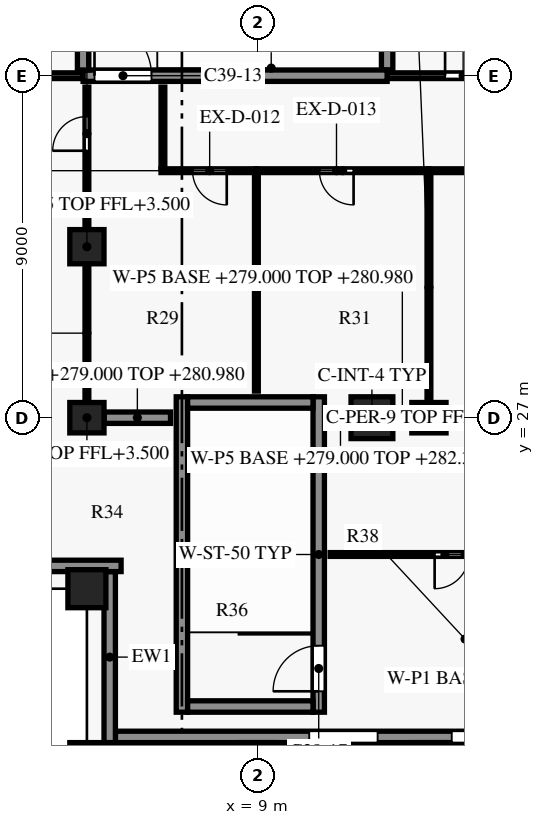
"""IFC4 building model, lengths in metres.
Left out: names, types, materials, properties, quantities, classifications, styles, units other than length and angle.
Written with IfcOpenShell. Run it as: python <this file> out.ifc"""

import sys

from ifc_helpers import new_model, si_unit, direction, frame, frame_2d, origin, origin_2d, place, context, subcontext, project, spatial, rectangle, extrude, element, fill, save


model = new_model("IFC4")
c1 = context("Model", 3, precision=1e-05, world=origin(), true_north=direction((0.0, 1.0)))
c2 = subcontext(c1, "Body", "Model", "MODEL_VIEW")
j1 = project(units=[si_unit("LENGTHUNIT", "METRE"), si_unit("PLANEANGLEUNIT", "RADIAN")], contexts=[c1])
p1 = place(None, origin())
s1 = spatial("IfcSite", under=j1, at=p1, CompositionType="ELEMENT")
p2 = place(p1, origin())
s2 = spatial("IfcBuilding", under=s1, at=p2, CompositionType="ELEMENT")
p3 = place(p2, frame((0.0, 0.0, 279.0)))
s3 = spatial("IfcBuildingStorey", under=s2, at=p3, CompositionType="ELEMENT", Elevation=279.0)
for number, where, z_axis, x_axis in (
    (1, (4.5, 18.0, 0.0), (0.0, 0.0, 1.0), (1.0, 0.0, 0.0)),
    (2, (9.0, 18.0, 0.0), (0.0, 0.0, 1.0), (1.0, 0.0, 0.0)),
    (3, (13.5, 18.0, 0.0), (0.0, 0.0, 1.0), (1.0, 0.0, 0.0)),
):
    element("IfcColumn", number, at=place(p3, frame(where, z_axis=z_axis, x_axis=x_axis)), inside=s3, PredefinedType="COLUMN", context=c2, shape_type="SweptSolid", body=[
        extrude(rectangle(XDim=0.9, YDim=0.9, at=origin_2d()), origin(), (0.0, 0.0, 1.0), 3.8),
    ])
p4 = place(p3, frame((4.5, 22.5, 0.0), z_axis=(0.0, 0.0, 1.0), x_axis=(1.0, 0.0, 0.0)))
e4 = element("IfcColumn", 4, at=p4, inside=s3, PredefinedType="COLUMN", context=c2, shape_type="SweptSolid", body=[
    extrude(rectangle(XDim=1.0, YDim=1.0, at=origin_2d()), origin(), (0.0, 0.0, 1.0), 3.8),
])
p5 = place(p3, frame((12.0, 27.0, 0.0), z_axis=(0.0, 0.0, 1.0), x_axis=(1.0, 0.0, 0.0)))
e5 = element("IfcColumn", 5, at=p5, inside=s3, PredefinedType="COLUMN", context=c2, shape_type="SweptSolid", body=[
    extrude(rectangle(XDim=1.1, YDim=1.1, at=origin_2d()), origin(), (0.0, 0.0, 1.0), 3.8),
])
p6 = place(p3, frame((31.05, 18.6, 0.0), z_axis=(0.0, 0.0, 1.0), x_axis=(-1.0, 0.0, 0.0)))
e6 = element("IfcWall", 6, at=p6, inside=s3, PredefinedType="SOLIDWALL", context=c2, shape_type="SweptSolid", body=[
    extrude(rectangle(XDim=25.8, YDim=0.3, at=frame_2d((12.9, 0.0))), origin(), (0.0, 0.0, 1.0), 3.15),
])
p7 = place(p6, frame((0.9, 0.0, 0.75)))
e7 = element("IfcOpeningElement", 7, at=p7, cuts=e6, PredefinedType="OPENING", context=c2, shape_type="SweptSolid", body=[
    extrude(rectangle(XDim=1.8, YDim=1.8, at=frame_2d((0.9, 0.9))), frame((0.0, 0.16, 0.0), z_axis=(0.0, -1.0, 0.0), x_axis=(1.0, 0.0, 0.0)), (0.0, 0.0, 1.0), 0.32),
])
p8 = place(p6, frame((5.4, 0.0, 0.75)))
e8 = element("IfcOpeningElement", 8, at=p8, cuts=e6, PredefinedType="OPENING", context=c2, shape_type="SweptSolid", body=[
    extrude(rectangle(XDim=1.8, YDim=1.8, at=frame_2d((0.9, 0.9))), frame((0.0, 0.16, 0.0), z_axis=(0.0, -1.0, 0.0), x_axis=(1.0, 0.0, 0.0)), (0.0, 0.0, 1.0), 0.32),
])
p9 = place(p6, frame((9.15, 0.0, 0.15)))
e9 = element("IfcOpeningElement", 9, at=p9, cuts=e6, PredefinedType="OPENING", context=c2, shape_type="SweptSolid", body=[
    extrude(rectangle(XDim=3.3, YDim=2.4, at=frame_2d((1.65, 1.2))), frame((0.0, 0.16, 0.0), z_axis=(0.0, -1.0, 0.0), x_axis=(1.0, 0.0, 0.0)), (0.0, 0.0, 1.0), 0.32),
])
p10 = place(p6, frame((13.65, 0.0, 0.15)))
e10 = element("IfcOpeningElement", 10, at=p10, cuts=e6, PredefinedType="OPENING", context=c2, shape_type="SweptSolid", body=[
    extrude(rectangle(XDim=3.3, YDim=2.4, at=frame_2d((1.65, 1.2))), frame((0.0, 0.16, 0.0), z_axis=(0.0, -1.0, 0.0), x_axis=(1.0, 0.0, 0.0)), (0.0, 0.0, 1.0), 0.32),
])
p11 = place(p6, frame((18.9, 0.0, 0.75)))
e11 = element("IfcOpeningElement", 11, at=p11, cuts=e6, PredefinedType="OPENING", context=c2, shape_type="SweptSolid", body=[
    extrude(rectangle(XDim=1.8, YDim=1.8, at=frame_2d((0.9, 0.9))), frame((0.0, 0.16, 0.0), z_axis=(0.0, -1.0, 0.0), x_axis=(1.0, 0.0, 0.0)), (0.0, 0.0, 1.0), 0.32),
])
p12 = place(p3, frame((5.4, 23.1, 0.0), z_axis=(0.0, 0.0, 1.0), x_axis=(-1.0, 0.0, 0.0)))
e12 = element("IfcWall", 12, at=p12, inside=s3, PredefinedType="SOLIDWALL", context=c2, shape_type="SweptSolid", body=[
    extrude(rectangle(XDim=5.031, YDim=0.3, at=frame_2d((2.516, 0.0))), origin(), (0.0, 0.0, 1.0), 3.15),
])
p13 = place(p3, frame((5.1, 18.45, 0.0), z_axis=(0.0, 0.0, 1.0), x_axis=(0.0, 1.0, 0.0)))
e13 = element("IfcWall", 13, at=p13, inside=s3, PredefinedType="SOLIDWALL", context=c2, shape_type="SweptSolid", body=[
    extrude(rectangle(XDim=4.5, YDim=0.3, at=frame_2d((2.25, 0.0))), origin(), (0.0, 0.0, 1.0), 3.15),
])
for number, where, z_axis, x_axis in (
    (14, (7.15, 19.4, 0.0), (0.0, 0.0, 1.0), (1.0, 0.0, 0.0)),
    (15, (7.15, 27.4, 0.0), (0.0, 0.0, 1.0), (1.0, 0.0, 0.0)),
):
    element("IfcWall", number, at=place(p3, frame(where, z_axis=z_axis, x_axis=x_axis)), inside=s3, PredefinedType="SHEAR", context=c2, shape_type="SweptSolid", body=[
        extrude(rectangle(XDim=3.3, YDim=0.3, at=frame_2d((1.65, 0.0))), origin(), (0.0, 0.0, 1.0), 3.5),
    ])
p14 = place(p3, frame((0.15, 36.0, 0.0), z_axis=(0.0, 0.0, 1.0), x_axis=(1.0, 0.0, 0.0)))
e16 = element("IfcWall", 16, at=p14, inside=s3, PredefinedType="SHEAR", context=c2, shape_type="SweptSolid", body=[
    extrude(rectangle(XDim=4.25, YDim=0.15, at=frame_2d((2.125, 0.0))), origin(), (0.0, 0.0, 1.0), 3.5),
])
p15 = place(p14, frame((1.6, 0.0, 0.0)))
e17 = element("IfcOpeningElement", 17, at=p15, cuts=e16, PredefinedType="OPENING", context=c2, shape_type="SweptSolid", body=[
    extrude(rectangle(XDim=0.9, YDim=2.1, at=frame_2d((0.45, 1.05))), frame((0.0, 0.085, 0.0), z_axis=(0.0, -1.0, 0.0), x_axis=(1.0, 0.0, 0.0)), (0.0, 0.0, 1.0), 0.17),
])
p16 = place(p3, frame((12.4, 36.0, 0.0), z_axis=(0.0, 0.0, 1.0), x_axis=(1.0, 0.0, 0.0)))
e18 = element("IfcWall", 18, at=p16, inside=s3, PredefinedType="SHEAR", context=c2, shape_type="SweptSolid", body=[
    extrude(rectangle(XDim=11.825, YDim=0.15, at=frame_2d((5.913, 0.0))), origin(), (0.0, 0.0, 1.0), 3.5),
])
p17 = place(p16, frame((1.525, 0.0, 0.0)))
e19 = element("IfcOpeningElement", 19, at=p17, cuts=e18, PredefinedType="OPENING", context=c2, shape_type="SweptSolid", body=[
    extrude(rectangle(XDim=0.95, YDim=2.1, at=frame_2d((0.475, 1.05))), frame((0.0, 0.085, 0.0), z_axis=(0.0, -1.0, 0.0), x_axis=(1.0, 0.0, 0.0)), (0.0, 0.0, 1.0), 0.17),
])
p18 = place(p16, frame((5.75, 0.0, 0.0)))
e20 = element("IfcOpeningElement", 20, at=p18, cuts=e18, PredefinedType="OPENING", context=c2, shape_type="SweptSolid", body=[
    extrude(rectangle(XDim=0.9, YDim=2.1, at=frame_2d((0.45, 1.05))), frame((0.0, 0.085, 0.0), z_axis=(0.0, -1.0, 0.0), x_axis=(1.0, 0.0, 0.0)), (0.0, 0.0, 1.0), 0.17),
])
p19 = place(p16, frame((10.525, 0.0, 0.0)))
e21 = element("IfcOpeningElement", 21, at=p19, cuts=e18, PredefinedType="OPENING", context=c2, shape_type="SweptSolid", body=[
    extrude(rectangle(XDim=0.9, YDim=2.1, at=frame_2d((0.45, 1.05))), frame((0.0, 0.085, 0.0), z_axis=(0.0, -1.0, 0.0), x_axis=(1.0, 0.0, 0.0)), (0.0, 0.0, 1.0), 0.17),
])
p20 = place(p3, frame((4.4, 36.0, 0.0), z_axis=(0.0, 0.0, 1.0), x_axis=(1.0, 0.0, 0.0)))
e22 = element("IfcWall", 22, at=p20, inside=s3, PredefinedType="SHEAR", context=c2, shape_type="SweptSolid", body=[
    extrude(rectangle(XDim=8.0, YDim=0.3, at=frame_2d((4.0, 0.0))), origin(), (0.0, 0.0, 1.0), 3.5),
])
p21 = place(p20, frame((0.3, 0.0, 0.0)))
e23 = element("IfcOpeningElement", 23, at=p21, cuts=e22, PredefinedType="OPENING", context=c2, shape_type="SweptSolid", body=[
    extrude(rectangle(XDim=1.5, YDim=2.2, at=frame_2d((0.75, 1.1))), frame((0.0, 0.16, 0.0), z_axis=(0.0, -1.0, 0.0), x_axis=(1.0, 0.0, 0.0)), (0.0, 0.0, 1.0), 0.32),
])
p22 = place(p3, frame((4.4, 36.15, 0.0), z_axis=(0.0, 0.0, 1.0), x_axis=(0.0, 1.0, 0.0)))
e24 = element("IfcWall", 24, at=p22, inside=s3, PredefinedType="SHEAR", context=c2, shape_type="SweptSolid", body=[
    extrude(rectangle(XDim=3.45, YDim=0.3, at=frame_2d((1.725, 0.0))), origin(), (0.0, 0.0, 1.0), 3.5),
])
p23 = place(p3, frame((7.0, 19.25, 0.0), z_axis=(0.0, 0.0, 1.0), x_axis=(0.0, 1.0, 0.0)))
e25 = element("IfcWall", 25, at=p23, inside=s3, PredefinedType="SHEAR", context=c2, shape_type="SweptSolid", body=[
    extrude(rectangle(XDim=8.3, YDim=0.3, at=frame_2d((4.15, 0.0))), origin(), (0.0, 0.0, 1.0), 3.5),
])
p24 = place(p3, frame((10.6, 19.25, 0.0), z_axis=(0.0, 0.0, 1.0), x_axis=(0.0, 1.0, 0.0)))
e26 = element("IfcWall", 26, at=p24, inside=s3, PredefinedType="SHEAR", context=c2, shape_type="SweptSolid", body=[
    extrude(rectangle(XDim=8.3, YDim=0.3, at=frame_2d((4.15, 0.0))), origin(), (0.0, 0.0, 1.0), 3.5),
])
p25 = place(p24, frame((0.55, 0.0, 0.0)))
e27 = element("IfcOpeningElement", 27, at=p25, cuts=e26, PredefinedType="OPENING", context=c2, shape_type="SweptSolid", body=[
    extrude(rectangle(XDim=1.2, YDim=2.2, at=frame_2d((0.6, 1.1))), frame((0.0, 0.16, 0.0), z_axis=(0.0, -1.0, 0.0), x_axis=(1.0, 0.0, 0.0)), (0.0, 0.0, 1.0), 0.32),
])
p26 = place(p3, frame((12.4, 36.15, 0.0), z_axis=(0.0, 0.0, 1.0), x_axis=(0.0, 1.0, 0.0)))
e28 = element("IfcWall", 28, at=p26, inside=s3, PredefinedType="SHEAR", context=c2, shape_type="SweptSolid", body=[
    extrude(rectangle(XDim=3.45, YDim=0.3, at=frame_2d((1.725, 0.0))), origin(), (0.0, 0.0, 1.0), 3.5),
])
p27 = place(p3, frame((18.0, 23.4, 0.0), z_axis=(0.0, 0.0, 1.0), x_axis=(-1.0, 0.0, 0.0)))
e29 = element("IfcWall", 29, at=p27, inside=s3, PredefinedType="PARTITIONING", context=c2, shape_type="SweptSolid", body=[
    extrude(rectangle(XDim=7.1, YDim=0.1, at=frame_2d((3.55, 0.0))), origin(), (0.0, 0.0, 1.0), 2.73),
])
p28 = place(p27, frame((2.55, 0.0, 0.0)))
e30 = element("IfcOpeningElement", 30, at=p28, cuts=e29, PredefinedType="OPENING", context=c2, shape_type="SweptSolid", body=[
    extrude(rectangle(XDim=1.8, YDim=2.1, at=frame_2d((0.9, 1.05))), frame((0.0, 0.06, 0.0), z_axis=(0.0, -1.0, 0.0), x_axis=(1.0, 0.0, 0.0)), (0.0, 0.0, 1.0), 0.12),
])
p29 = place(p3, frame((6.7, 27.0, 0.0), z_axis=(0.0, 0.0, 1.0), x_axis=(-1.0, 0.0, 0.0)))
e31 = element("IfcWall", 31, at=p29, inside=s3, PredefinedType="PARTITIONING", context=c2, shape_type="SweptSolid", body=[
    extrude(rectangle(XDim=1.745, YDim=0.3, at=frame_2d((0.873, 0.0))), origin(), (0.0, 0.0, 1.0), 1.98),
])
p30 = place(p3, frame((10.9, 27.0, 0.0), z_axis=(0.0, 0.0, 1.0), x_axis=(1.0, 0.0, 0.0)))
e32 = element("IfcWall", 32, at=p30, inside=s3, PredefinedType="PARTITIONING", context=c2, shape_type="SweptSolid", body=[
    extrude(rectangle(XDim=0.545, YDim=0.3, at=frame_2d((0.272, 0.0))), origin(), (0.0, 0.0, 1.0), 3.33),
])
p31 = place(p3, frame((12.555, 27.0, 0.0), z_axis=(0.0, 0.0, 1.0), x_axis=(1.0, 0.0, 0.0)))
e33 = element("IfcWall", 33, at=p31, inside=s3, PredefinedType="PARTITIONING", context=c2, shape_type="SweptSolid", body=[
    extrude(rectangle(XDim=0.49, YDim=0.3, at=frame_2d((0.245, 0.0))), origin(), (0.0, 0.0, 1.0), 1.98),
])
p32 = place(p3, frame((13.955, 27.0, 0.0), z_axis=(0.0, 0.0, 1.0), x_axis=(1.0, 0.0, 0.0)))
e34 = element("IfcWall", 34, at=p32, inside=s3, PredefinedType="PARTITIONING", context=c2, shape_type="SweptSolid", body=[
    extrude(rectangle(XDim=3.945, YDim=0.3, at=frame_2d((1.972, 0.0))), origin(), (0.0, 0.0, 1.0), 2.73),
])
p33 = place(p3, frame((4.5, 27.405, 0.0), z_axis=(0.0, 0.0, 1.0), x_axis=(0.0, 1.0, 0.0)))
e35 = element("IfcWall", 35, at=p33, inside=s3, PredefinedType="PARTITIONING", context=c2, shape_type="SweptSolid", body=[
    extrude(rectangle(XDim=3.64, YDim=0.1, at=frame_2d((1.82, 0.0))), origin(), (0.0, 0.0, 1.0), 1.98),
])
p34 = place(p3, frame((4.5, 31.955, 0.0), z_axis=(0.0, 0.0, 1.0), x_axis=(0.0, 1.0, 0.0)))
e36 = element("IfcWall", 36, at=p34, inside=s3, PredefinedType="PARTITIONING", context=c2, shape_type="SweptSolid", body=[
    extrude(rectangle(XDim=3.745, YDim=0.1, at=frame_2d((1.873, 0.0))), origin(), (0.0, 0.0, 1.0), 3.33),
])
p35 = place(p34, frame((2.07, 0.0, 0.0)))
e37 = element("IfcOpeningElement", 37, at=p35, cuts=e36, PredefinedType="OPENING", context=c2, shape_type="SweptSolid", body=[
    extrude(rectangle(XDim=0.9, YDim=2.1, at=frame_2d((0.45, 1.05))), frame((0.0, 0.06, 0.0), z_axis=(0.0, -1.0, 0.0), x_axis=(1.0, 0.0, 0.0)), (0.0, 0.0, 1.0), 0.12),
])
p36 = place(p3, frame((8.96, 33.45, 0.0), z_axis=(0.0, 0.0, 1.0), x_axis=(0.0, -1.0, 0.0)))
e38 = element("IfcWall", 38, at=p36, inside=s3, PredefinedType="PARTITIONING", context=c2, shape_type="SweptSolid", body=[
    extrude(rectangle(XDim=5.75, YDim=0.1, at=frame_2d((2.875, 0.0))), origin(), (0.0, 0.0, 1.0), 3.33),
])
p37 = place(p3, frame((13.5, 33.45, 0.0), z_axis=(0.0, 0.0, 1.0), x_axis=(0.0, -1.0, 0.0)))
e39 = element("IfcWall", 39, at=p37, inside=s3, PredefinedType="PARTITIONING", context=c2, shape_type="SweptSolid", body=[
    extrude(rectangle(XDim=6.045, YDim=0.1, at=frame_2d((3.022, 0.0))), origin(), (0.0, 0.0, 1.0), 1.98),
])
p38 = place(p3, frame((8.96, 33.5, 0.0), z_axis=(0.0, 0.0, 1.0), x_axis=(-1.0, 0.0, 0.0)))
e40 = element("IfcWall", 40, at=p38, inside=s3, PredefinedType="PARTITIONING", context=c2, shape_type="SweptSolid", body=[
    extrude(rectangle(XDim=2.51, YDim=0.1, at=frame_2d((1.255, 0.0))), origin(), (0.0, 0.0, 1.0), 3.33),
])
p39 = place(p38, frame((0.78, 0.0, 0.0)))
e41 = element("IfcOpeningElement", 41, at=p39, cuts=e40, PredefinedType="OPENING", context=c2, shape_type="SweptSolid", body=[
    extrude(rectangle(XDim=0.9, YDim=2.1, at=frame_2d((0.45, 1.05))), frame((0.0, 0.06, 0.0), z_axis=(0.0, -1.0, 0.0), x_axis=(1.0, 0.0, 0.0)), (0.0, 0.0, 1.0), 0.12),
])
p40 = place(p3, frame((13.5, 33.5, 0.0), z_axis=(0.0, 0.0, 1.0), x_axis=(-1.0, 0.0, 0.0)))
e42 = element("IfcWall", 42, at=p40, inside=s3, PredefinedType="PARTITIONING", context=c2, shape_type="SweptSolid", body=[
    extrude(rectangle(XDim=4.54, YDim=0.1, at=frame_2d((2.27, 0.0))), origin(), (0.0, 0.0, 1.0), 1.98),
])
p41 = place(p40, frame((1.982, 0.0, 0.0)))
e43 = element("IfcOpeningElement", 43, at=p41, cuts=e42, PredefinedType="OPENING", context=c2, shape_type="SweptSolid", body=[
    extrude(rectangle(XDim=0.9, YDim=2.1, at=frame_2d((0.45, 1.05))), frame((0.0, 0.06, 0.0), z_axis=(0.0, -1.0, 0.0), x_axis=(1.0, 0.0, 0.0)), (0.0, 0.0, 1.0), 0.12),
])
p42 = place(p3, frame((17.95, 33.5, 0.0), z_axis=(0.0, 0.0, 1.0), x_axis=(-1.0, 0.0, 0.0)))
e44 = element("IfcWall", 44, at=p42, inside=s3, PredefinedType="PARTITIONING", context=c2, shape_type="SweptSolid", body=[
    extrude(rectangle(XDim=4.45, YDim=0.1, at=frame_2d((2.225, 0.0))), origin(), (0.0, 0.0, 1.0), 1.98),
])
p43 = place(p3, frame((6.5, 33.55, 0.0), z_axis=(0.0, 0.0, 1.0), x_axis=(0.0, 1.0, 0.0)))
e45 = element("IfcWall", 45, at=p43, inside=s3, PredefinedType="PARTITIONING", context=c2, shape_type="SweptSolid", body=[
    extrude(rectangle(XDim=2.15, YDim=0.1, at=frame_2d((1.075, 0.0))), origin(), (0.0, 0.0, 1.0), 3.33),
])
p44 = place(p3, frame((4.5, 27.0, 0.0), z_axis=(0.0, 0.0, 1.0), x_axis=(1.0, 0.0, 0.0)))
e46 = element("IfcColumn", 46, at=p44, inside=s3, PredefinedType="COLUMN", context=c2, shape_type="SweptSolid", body=[
    extrude(rectangle(XDim=0.9, YDim=0.8, at=origin_2d()), origin(), (0.0, 0.0, 1.0), 3.5),
])
p45 = place(p3, frame((4.5, 31.5, 0.0), z_axis=(0.0, 0.0, 1.0), x_axis=(1.0, 0.0, 0.0)))
e47 = element("IfcColumn", 47, at=p45, inside=s3, PredefinedType="COLUMN", context=c2, shape_type="SweptSolid", body=[
    extrude(rectangle(XDim=0.9, YDim=0.9, at=origin_2d()), origin(), (0.0, 0.0, 1.0), 3.5),
])
p46 = place(p3, frame((13.5, 27.0, 0.0), z_axis=(0.0, 0.0, 1.0), x_axis=(1.0, 0.0, 0.0)))
e48 = element("IfcColumn", 48, at=p46, inside=s3, PredefinedType="COLUMN", context=c2, shape_type="SweptSolid", body=[
    extrude(rectangle(XDim=0.9, YDim=0.8, at=origin_2d()), origin(), (0.0, 0.0, 1.0), 3.5),
])
p47 = place(p10, origin())
e49 = element("IfcWindow", 49, at=p47, inside=s3, PartitioningType="SINGLE_PANEL", PredefinedType="WINDOW", context=c2, shape_type="SweptSolid", body=[
    extrude(rectangle(XDim=3.3, YDim=2.4, at=frame_2d((1.65, 1.2))), frame((0.0, 0.03, 0.0), z_axis=(0.0, -1.0, 0.0), x_axis=(1.0, 0.0, 0.0)), (0.0, 0.0, 1.0), 0.06),
])
fill(e10, e49)
p48 = place(p11, origin())
e50 = element("IfcWindow", 50, at=p48, inside=s3, PartitioningType="SINGLE_PANEL", PredefinedType="WINDOW", context=c2, shape_type="SweptSolid", body=[
    extrude(rectangle(XDim=1.8, YDim=1.8, at=frame_2d((0.9, 0.9))), frame((0.0, 0.03, 0.0), z_axis=(0.0, -1.0, 0.0), x_axis=(1.0, 0.0, 0.0)), (0.0, 0.0, 1.0), 0.06),
])
fill(e11, e50)
p49 = place(p17, origin())
e51 = element("IfcDoor", 51, at=p49, inside=s3, OperationType="SINGLE_SWING_RIGHT", PredefinedType="DOOR", context=c2, shape_type="SweptSolid", body=[
    extrude(rectangle(XDim=0.95, YDim=2.1, at=frame_2d((0.475, 1.05))), frame((0.0, 0.025, 0.0), z_axis=(0.0, -1.0, 0.0), x_axis=(1.0, 0.0, 0.0)), (0.0, 0.0, 1.0), 0.05),
])
fill(e19, e51)
p50 = place(p21, origin())
e52 = element("IfcDoor", 52, at=p50, inside=s3, OperationType="SINGLE_SWING_RIGHT", PredefinedType="DOOR", context=c2, shape_type="SweptSolid", body=[
    extrude(rectangle(XDim=1.5, YDim=2.2, at=frame_2d((0.75, 1.1))), frame((0.0, 0.025, 0.0), z_axis=(0.0, -1.0, 0.0), x_axis=(1.0, 0.0, 0.0)), (0.0, 0.0, 1.0), 0.05),
])
fill(e23, e52)
p51 = place(p25, origin())
e53 = element("IfcDoor", 53, at=p51, inside=s3, OperationType="SINGLE_SWING_RIGHT", PredefinedType="DOOR", context=c2, shape_type="SweptSolid", body=[
    extrude(rectangle(XDim=1.2, YDim=2.2, at=frame_2d((0.6, 1.1))), frame((0.0, 0.025, 0.0), z_axis=(0.0, -1.0, 0.0), x_axis=(1.0, 0.0, 0.0)), (0.0, 0.0, 1.0), 0.05),
])
fill(e27, e53)
p52 = place(p28, origin())
e54 = element("IfcDoor", 54, at=p52, inside=s3, OperationType="DOUBLE_DOOR_SINGLE_SWING", PredefinedType="DOOR", context=c2, shape_type="SweptSolid", body=[
    extrude(rectangle(XDim=1.8, YDim=2.1, at=frame_2d((0.9, 1.05))), frame((0.0, 0.025, 0.0), z_axis=(0.0, -1.0, 0.0), x_axis=(1.0, 0.0, 0.0)), (0.0, 0.0, 1.0), 0.05),
])
fill(e30, e54)
p53 = place(p39, origin())
e55 = element("IfcDoor", 55, at=p53, inside=s3, OperationType="SINGLE_SWING_LEFT", PredefinedType="DOOR", context=c2, shape_type="SweptSolid", body=[
    extrude(rectangle(XDim=0.9, YDim=2.1, at=frame_2d((0.45, 1.05))), frame((0.0, 0.025, 0.0), z_axis=(0.0, -1.0, 0.0), x_axis=(1.0, 0.0, 0.0)), (0.0, 0.0, 1.0), 0.05),
])
fill(e41, e55)
p54 = place(p41, origin())
e56 = element("IfcDoor", 56, at=p54, inside=s3, OperationType="SINGLE_SWING_LEFT", PredefinedType="DOOR", context=c2, shape_type="SweptSolid", body=[
    extrude(rectangle(XDim=0.9, YDim=2.1, at=frame_2d((0.45, 1.05))), frame((0.0, 0.025, 0.0), z_axis=(0.0, -1.0, 0.0), x_axis=(1.0, 0.0, 0.0)), (0.0, 0.0, 1.0), 0.05),
])
fill(e43, e56)
p55 = place(p35, origin())
e57 = element("IfcDoor", 57, at=p55, inside=s3, OperationType="SINGLE_SWING_RIGHT", PredefinedType="DOOR", context=c2, shape_type="SweptSolid", body=[
    extrude(rectangle(XDim=0.9, YDim=2.1, at=frame_2d((0.45, 1.05))), frame((0.0, 0.025, 0.0), z_axis=(0.0, -1.0, 0.0), x_axis=(1.0, 0.0, 0.0)), (0.0, 0.0, 1.0), 0.05),
])
fill(e37, e57)
save(model, sys.argv[1])
